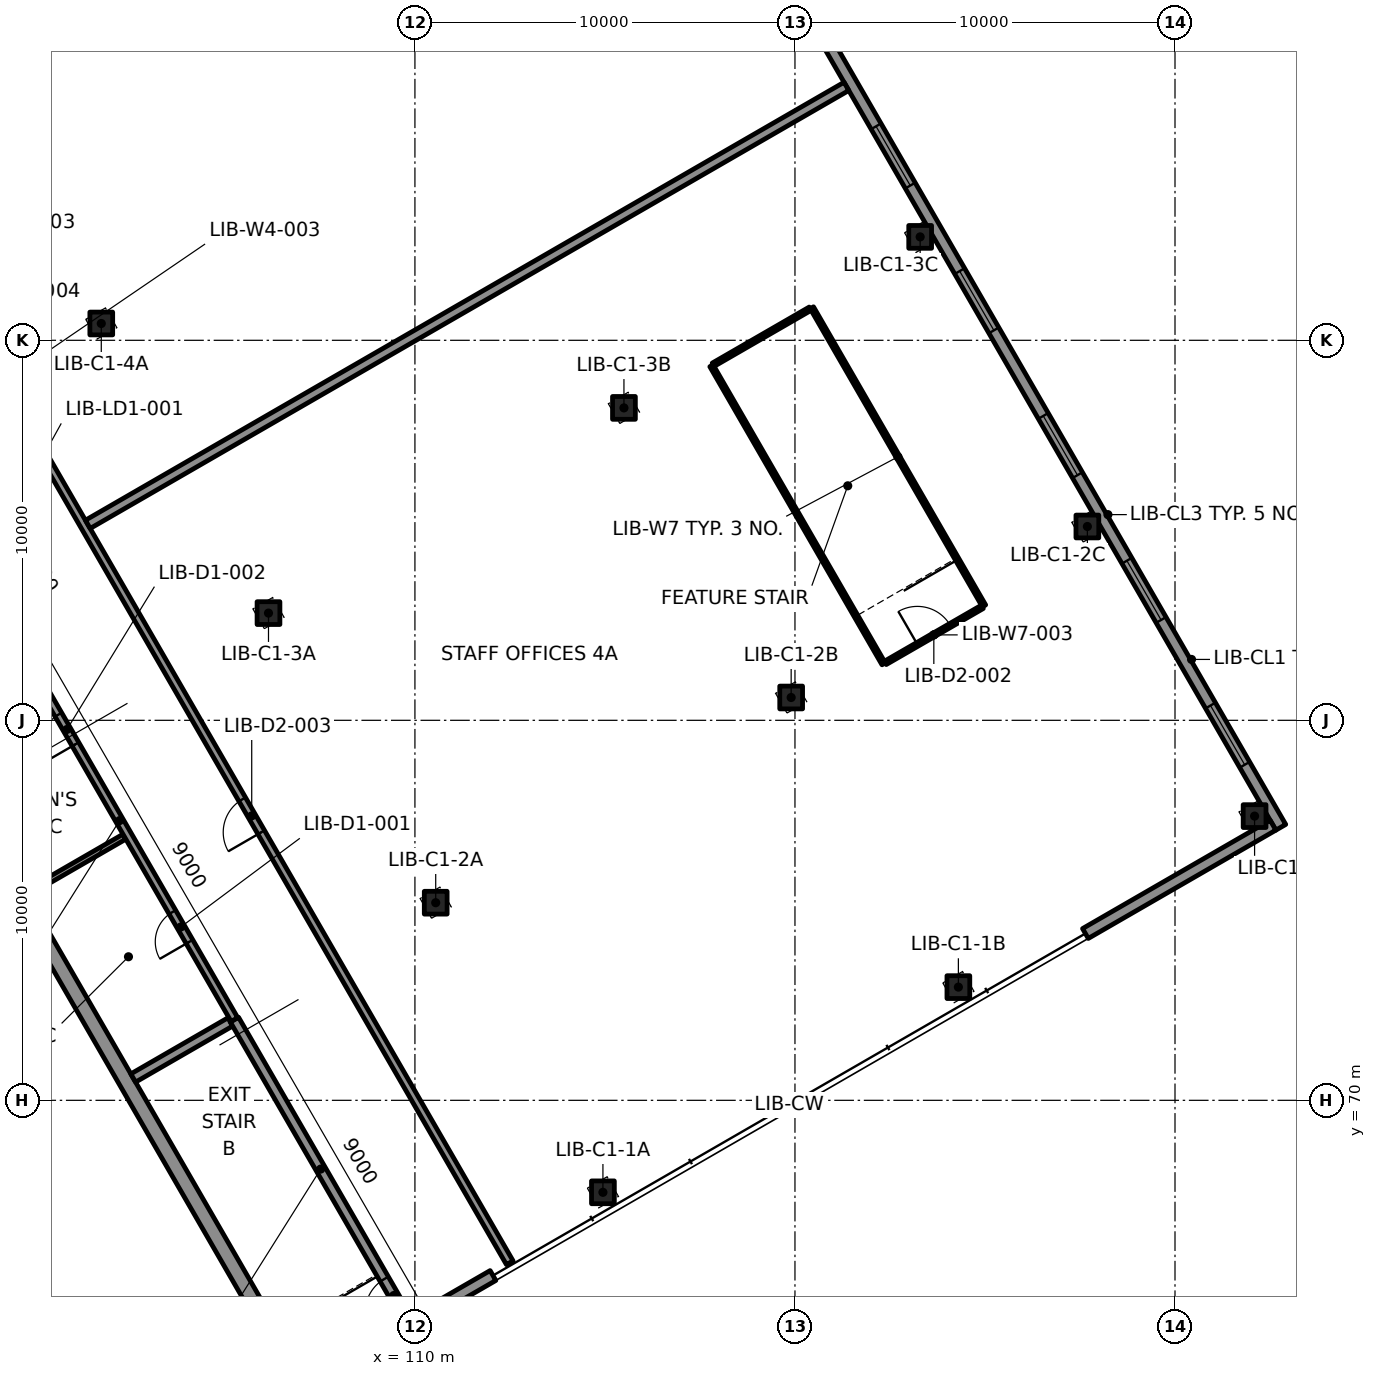
"""IFC4 building model, lengths in metres.
Left out: names, types, materials, properties, quantities, classifications, styles, units other than length and angle.
Written with IfcOpenShell. Run it as: python <this file> out.ifc"""

import sys

from ifc_helpers import new_model, si_unit, direction, frame, frame_2d, origin, origin_2d, place, context, subcontext, project, spatial, rectangle, extrude, element, fill, save


model = new_model("IFC4")
c1 = context("Model", 3, precision=1e-05, world=origin(), true_north=direction((0.0, 1.0)))
c2 = subcontext(c1, "Body", "Model", "MODEL_VIEW")
j1 = project(units=[si_unit("LENGTHUNIT", "METRE"), si_unit("PLANEANGLEUNIT", "RADIAN")], contexts=[c1])
p1 = place(None, origin())
s1 = spatial("IfcSite", under=j1, at=p1, CompositionType="ELEMENT")
p2 = place(p1, origin())
s2 = spatial("IfcBuilding", under=s1, at=p2, CompositionType="ELEMENT")
p3 = place(p2, frame((0.0, 0.0, 21.8)))
s3 = spatial("IfcBuildingStorey", under=s2, at=p3, CompositionType="ELEMENT", Elevation=21.8)
p4 = place(p3, frame((101.821, 68.315, -0.0), z_axis=(0.0, 0.0, 1.0), x_axis=(-0.5, 0.866025403784, 0.0)))
e1 = element("IfcColumn", 1, at=p4, inside=s3, PredefinedType="COLUMN", context=c2, shape_type="SweptSolid", body=[
    extrude(rectangle(XDim=1.2, YDim=1.5, at=origin_2d()), origin(), (0.0, 0.0, 1.0), 4.6),
])
p5 = place(p3, frame((103.019, 59.863, 0.0), z_axis=(0.0, 0.0, 1.0), x_axis=(-0.866027754727, 0.499995928025, 0.0)))
e2 = element("IfcWall", 2, at=p5, inside=s3, PredefinedType="PARTITIONING", context=c2, shape_type="SweptSolid", body=[
    extrude(rectangle(XDim=13.214, YDim=0.15, at=frame_2d((6.607, 0.0))), origin(), (0.0, 0.0, 1.0), 3.7),
])
for number, where, z_axis, x_axis in (
    (3, (114.947, 67.579, -0.36), (0.0, 0.0, 1.0), (1.0, 0.0, 0.0)),
    (4, (124.3, 72.979, -0.36), (0.0, 0.0, 1.0), (1.0, 0.0, 0.0)),
    (5, (132.094, 77.479, -0.36), (0.0, 0.0, 1.0), (1.0, 0.0, 0.0)),
    (6, (110.547, 75.2, -0.36), (0.0, 0.0, 1.0), (1.0, 0.0, 0.0)),
    (7, (119.9, 80.6, -0.36), (0.0, 0.0, 1.0), (1.0, 0.0, 0.0)),
    (8, (127.694, 85.1, -0.36), (0.0, 0.0, 1.0), (1.0, 0.0, 0.0)),
    (9, (106.147, 82.821, -0.36), (0.0, 0.0, 1.0), (1.0, 0.0, 0.0)),
    (10, (115.5, 88.221, -0.36), (0.0, 0.0, 1.0), (1.0, 0.0, 0.0)),
    (11, (123.294, 92.721, -0.36), (0.0, 0.0, 1.0), (1.0, 0.0, 0.0)),
    (12, (101.747, 90.442, -0.36), (0.0, 0.0, 1.0), (1.0, 0.0, 0.0)),
):
    element("IfcColumn", number, at=place(p3, frame(where, z_axis=z_axis, x_axis=x_axis)), inside=s3, PredefinedType="COLUMN", context=c2, shape_type="SweptSolid", body=[
        extrude(rectangle(XDim=0.6, YDim=0.6, at=origin_2d()), origin(), (0.0, 0.0, 1.0), 4.66),
    ])
p6 = place(p3, frame((107.106, 62.36, 0.0), z_axis=(0.0, 0.0, 1.0), x_axis=(-0.49999992739, 0.866025445706, 0.0)))
e13 = element("IfcWall", 13, at=p6, inside=s3, PredefinedType="SOLIDWALL", context=c2, shape_type="SweptSolid", body=[
    extrude(rectangle(XDim=54.0, YDim=0.4, at=frame_2d((27.0, 0.0))), origin(), (0.0, 0.0, 1.0), 4.3),
])
p7 = place(p3, frame((132.784, 77.185, 0.0), z_axis=(0.0, 0.0, 1.0), x_axis=(-0.49999992739, 0.866025445706, 0.0)))
e14 = element("IfcWall", 14, at=p7, inside=s3, PredefinedType="SOLIDWALL", context=c2, shape_type="SweptSolid", body=[
    extrude(rectangle(XDim=54.0, YDim=0.3, at=frame_2d((27.0, 0.0))), origin(), (0.0, 0.0, 1.0), 4.3),
])
p8 = place(p7, frame((1.9, 0.0, 0.9)))
e15 = element("IfcOpeningElement", 15, at=p8, cuts=e14, PredefinedType="OPENING", context=c2, shape_type="SweptSolid", body=[
    extrude(rectangle(XDim=1.8, YDim=2.4, at=frame_2d((0.9, 1.2))), frame((0.0, 0.16, 0.0), z_axis=(0.0, -1.0, 0.0), x_axis=(1.0, 0.0, 0.0)), (0.0, 0.0, 1.0), 0.32),
])
p9 = place(p7, frame((6.3, 0.0, 0.9)))
e16 = element("IfcOpeningElement", 16, at=p9, cuts=e14, PredefinedType="OPENING", context=c2, shape_type="SweptSolid", body=[
    extrude(rectangle(XDim=1.8, YDim=2.4, at=frame_2d((0.9, 1.2))), frame((0.0, 0.16, 0.0), z_axis=(0.0, -1.0, 0.0), x_axis=(1.0, 0.0, 0.0)), (0.0, 0.0, 1.0), 0.32),
])
p10 = place(p7, frame((10.7, 0.0, 0.9)))
e17 = element("IfcOpeningElement", 17, at=p10, cuts=e14, PredefinedType="OPENING", context=c2, shape_type="SweptSolid", body=[
    extrude(rectangle(XDim=1.8, YDim=2.4, at=frame_2d((0.9, 1.2))), frame((0.0, 0.16, 0.0), z_axis=(0.0, -1.0, 0.0), x_axis=(1.0, 0.0, 0.0)), (0.0, 0.0, 1.0), 0.32),
])
p11 = place(p7, frame((15.1, 0.0, 0.9)))
e18 = element("IfcOpeningElement", 18, at=p11, cuts=e14, PredefinedType="OPENING", context=c2, shape_type="SweptSolid", body=[
    extrude(rectangle(XDim=1.8, YDim=2.4, at=frame_2d((0.9, 1.2))), frame((0.0, 0.16, 0.0), z_axis=(0.0, -1.0, 0.0), x_axis=(1.0, 0.0, 0.0)), (0.0, 0.0, 1.0), 0.32),
])
p12 = place(p7, frame((19.5, 0.0, 0.9)))
e19 = element("IfcOpeningElement", 19, at=p12, cuts=e14, PredefinedType="OPENING", context=c2, shape_type="SweptSolid", body=[
    extrude(rectangle(XDim=1.8, YDim=2.4, at=frame_2d((0.9, 1.2))), frame((0.0, 0.16, 0.0), z_axis=(0.0, -1.0, 0.0), x_axis=(1.0, 0.0, 0.0)), (0.0, 0.0, 1.0), 0.32),
])
p13 = place(p7, frame((41.5, 0.0, 0.9)))
e20 = element("IfcOpeningElement", 20, at=p13, cuts=e14, PredefinedType="OPENING", context=c2, shape_type="SweptSolid", body=[
    extrude(rectangle(XDim=1.8, YDim=2.4, at=frame_2d((0.9, 1.2))), frame((0.0, 0.16, 0.0), z_axis=(0.0, -1.0, 0.0), x_axis=(1.0, 0.0, 0.0)), (0.0, 0.0, 1.0), 0.32),
])
p14 = place(p7, frame((45.9, 0.0, 0.9)))
e21 = element("IfcOpeningElement", 21, at=p14, cuts=e14, PredefinedType="OPENING", context=c2, shape_type="SweptSolid", body=[
    extrude(rectangle(XDim=1.8, YDim=2.4, at=frame_2d((0.9, 1.2))), frame((0.0, 0.16, 0.0), z_axis=(0.0, -1.0, 0.0), x_axis=(1.0, 0.0, 0.0)), (0.0, 0.0, 1.0), 0.32),
])
p15 = place(p7, frame((50.3, 0.0, 0.9)))
e22 = element("IfcOpeningElement", 22, at=p15, cuts=e14, PredefinedType="OPENING", context=c2, shape_type="SweptSolid", body=[
    extrude(rectangle(XDim=1.8, YDim=2.4, at=frame_2d((0.9, 1.2))), frame((0.0, 0.16, 0.0), z_axis=(0.0, -1.0, 0.0), x_axis=(1.0, 0.0, 0.0)), (0.0, 0.0, 1.0), 0.32),
])
p16 = place(p3, frame((107.204, 62.59, 0.0), z_axis=(0.0, 0.0, 1.0), x_axis=(0.866045472092, 0.499965239061, 0.0)))
e23 = element("IfcWall", 23, at=p16, inside=s3, PredefinedType="SOLIDWALL", context=c2, shape_type="SweptSolid", body=[
    extrude(rectangle(XDim=5.6, YDim=0.3, at=frame_2d((2.8, 0.0))), origin(), (0.0, 0.0, 1.0), 4.3),
])
p17 = place(p3, frame((127.643, 74.389, 0.0), z_axis=(0.0, 0.0, 1.0), x_axis=(0.866025820012, 0.499999279071, 0.0)))
e24 = element("IfcWall", 24, at=p17, inside=s3, PredefinedType="SOLIDWALL", context=c2, shape_type="SweptSolid", body=[
    extrude(rectangle(XDim=5.7, YDim=0.3, at=frame_2d((2.85, 0.0))), origin(), (0.0, 0.0, 1.0), 4.3),
])
p18 = place(p3, frame((102.587, 70.587, 0.0), z_axis=(0.0, 0.0, 1.0), x_axis=(0.866039495442, 0.49997559174, 0.0)))
e25 = element("IfcWall", 25, at=p18, inside=s3, PredefinedType="SOLIDWALL", context=c2, shape_type="SweptSolid", body=[
    extrude(rectangle(XDim=2.95, YDim=0.25, at=frame_2d((1.475, 0.0))), origin(), (0.0, 0.0, 1.0), 4.3),
])
p19 = place(p3, frame((109.792, 64.257, 0.0), z_axis=(0.0, 0.0, 1.0), x_axis=(-0.499994616197, 0.866028512102, 0.0)))
e26 = element("IfcWall", 26, at=p19, inside=s3, PredefinedType="SOLIDWALL", context=c2, shape_type="SweptSolid", body=[
    extrude(rectangle(XDim=9.085, YDim=0.25, at=frame_2d((4.542, 0.0))), origin(), (0.0, 0.0, 1.0), 4.3),
])
p20 = place(p19, frame((0.2, 0.0, 0.0)))
e27 = element("IfcOpeningElement", 27, at=p20, cuts=e26, PredefinedType="OPENING", context=c2, shape_type="SweptSolid", body=[
    extrude(rectangle(XDim=1.0, YDim=2.1, at=frame_2d((0.5, 1.05))), frame((0.0, 0.135, 0.0), z_axis=(0.0, -1.0, 0.0), x_axis=(1.0, 0.0, 0.0)), (0.0, 0.0, 1.0), 0.27),
])
p21 = place(p3, frame((99.779, 75.45, 0.0), z_axis=(0.0, 0.0, 1.0), x_axis=(0.866017493347, 0.500013701029, 0.0)))
e28 = element("IfcWall", 28, at=p21, inside=s3, PredefinedType="PARTITIONING", context=c2, shape_type="SweptSolid", body=[
    extrude(rectangle(XDim=2.975, YDim=0.15, at=frame_2d((1.488, 0.0))), origin(), (0.0, 0.0, 1.0), 4.3),
])
p22 = place(p3, frame((105.25, 72.125, 0.0), z_axis=(0.0, 0.0, 1.0), x_axis=(-0.499996309931, 0.866027534236, 0.0)))
e29 = element("IfcWall", 29, at=p22, inside=s3, PredefinedType="PARTITIONING", context=c2, shape_type="SweptSolid", body=[
    extrude(rectangle(XDim=12.09, YDim=0.2, at=frame_2d((6.045, 0.0))), origin(), (0.0, 0.0, 1.0), 4.3),
])
p23 = place(p22, frame((2.365, 0.0, 0.0)))
e30 = element("IfcOpeningElement", 30, at=p23, cuts=e29, PredefinedType="OPENING", context=c2, shape_type="SweptSolid", body=[
    extrude(rectangle(XDim=0.9, YDim=2.1, at=frame_2d((0.45, 1.05))), frame((0.0, 0.11, 0.0), z_axis=(0.0, -1.0, 0.0), x_axis=(1.0, 0.0, 0.0)), (0.0, 0.0, 1.0), 0.22),
])
p24 = place(p22, frame((8.365, 0.0, 0.0)))
e31 = element("IfcOpeningElement", 31, at=p24, cuts=e29, PredefinedType="OPENING", context=c2, shape_type="SweptSolid", body=[
    extrude(rectangle(XDim=0.9, YDim=2.1, at=frame_2d((0.45, 1.05))), frame((0.0, 0.11, 0.0), z_axis=(0.0, -1.0, 0.0), x_axis=(1.0, 0.0, 0.0)), (0.0, 0.0, 1.0), 0.22),
])
p25 = place(p3, frame((112.496, 65.725, 0.0), z_axis=(0.0, 0.0, 1.0), x_axis=(-0.499998673217, 0.866026169802, 0.0)))
e32 = element("IfcWall", 32, at=p25, inside=s3, PredefinedType="PARTITIONING", context=c2, shape_type="SweptSolid", body=[
    extrude(rectangle(XDim=53.48, YDim=0.2, at=frame_2d((26.74, 0.0))), origin(), (0.0, 0.0, 1.0), 4.3),
])
p26 = place(p25, frame((13.08, 0.0, 0.0)))
e33 = element("IfcOpeningElement", 33, at=p26, cuts=e32, PredefinedType="OPENING", context=c2, shape_type="SweptSolid", body=[
    extrude(rectangle(XDim=1.0, YDim=2.1, at=frame_2d((0.5, 1.05))), frame((0.0, 0.11, 0.0), z_axis=(0.0, -1.0, 0.0), x_axis=(1.0, 0.0, 0.0)), (0.0, 0.0, 1.0), 0.22),
])
p27 = place(p25, frame((26.28, 0.0, 0.0)))
e34 = element("IfcOpeningElement", 34, at=p27, cuts=e32, PredefinedType="OPENING", context=c2, shape_type="SweptSolid", body=[
    extrude(rectangle(XDim=1.0, YDim=2.1, at=frame_2d((0.5, 1.05))), frame((0.0, 0.11, 0.0), z_axis=(0.0, -1.0, 0.0), x_axis=(1.0, 0.0, 0.0)), (0.0, 0.0, 1.0), 0.22),
])
p28 = place(p25, frame((43.88, 0.0, 0.0)))
e35 = element("IfcOpeningElement", 35, at=p28, cuts=e32, PredefinedType="OPENING", context=c2, shape_type="SweptSolid", body=[
    extrude(rectangle(XDim=1.0, YDim=2.1, at=frame_2d((0.5, 1.05))), frame((0.0, 0.11, 0.0), z_axis=(0.0, -1.0, 0.0), x_axis=(1.0, 0.0, 0.0)), (0.0, 0.0, 1.0), 0.22),
])
p29 = place(p25, frame((50.58, 0.0, 0.0)))
e36 = element("IfcOpeningElement", 36, at=p29, cuts=e32, PredefinedType="OPENING", context=c2, shape_type="SweptSolid", body=[
    extrude(rectangle(XDim=1.0, YDim=2.1, at=frame_2d((0.5, 1.05))), frame((0.0, 0.11, 0.0), z_axis=(0.0, -1.0, 0.0), x_axis=(1.0, 0.0, 0.0)), (0.0, 0.0, 1.0), 0.22),
])
p30 = place(p3, frame((101.392, 85.157, 0.0), z_axis=(0.0, 0.0, 1.0), x_axis=(0.866022961126, 0.500004230785, 0.0)))
e37 = element("IfcWall", 37, at=p30, inside=s3, PredefinedType="SOLIDWALL", context=c2, shape_type="SweptSolid", body=[
    extrude(rectangle(XDim=23.05, YDim=0.25, at=frame_2d((11.525, 0.0))), origin(), (0.0, 0.0, 1.0), 4.3),
])
for number, where, z_axis, x_axis in (
    (38, (122.333, 81.486, 0.0), (0.0, 0.0, 1.0), (-0.5, 0.866, 0.0)),
    (39, (124.975, 83.01, 0.0), (0.0, 0.0, 1.0), (-0.5, 0.866, 0.0)),
):
    element("IfcWall", number, at=place(p3, frame(where, z_axis=z_axis, x_axis=x_axis)), inside=s3, PredefinedType="PARTITIONING", context=c2, shape_type="SweptSolid", body=[
        extrude(rectangle(XDim=9.06, YDim=0.1, at=frame_2d((4.53, 0.0))), origin(), (0.0, 0.0, 1.0), 4.3),
    ])
p31 = place(p3, frame((122.377, 81.51, 0.0), z_axis=(0.0, 0.0, 1.0), x_axis=(0.866003658127, 0.500037662692, 0.0)))
e40 = element("IfcWall", 40, at=p31, inside=s3, PredefinedType="PARTITIONING", context=c2, shape_type="SweptSolid", body=[
    extrude(rectangle(XDim=2.95, YDim=0.1, at=frame_2d((1.475, 0.0))), origin(), (0.0, 0.0, 1.0), 4.3),
])
p32 = place(p31, frame((0.975, 0.0, 0.0)))
e41 = element("IfcOpeningElement", 41, at=p32, cuts=e40, PredefinedType="OPENING", context=c2, shape_type="SweptSolid", body=[
    extrude(rectangle(XDim=1.0, YDim=2.1, at=frame_2d((0.5, 1.05))), frame((0.0, 0.06, 0.0), z_axis=(0.0, -1.0, 0.0), x_axis=(1.0, 0.0, 0.0)), (0.0, 0.0, 1.0), 0.12),
])
p33 = place(p3, frame((117.847, 89.357, 0.0), z_axis=(0.0, 0.0, 1.0), x_axis=(0.866003658127, 0.500037662692, 0.0)))
e42 = element("IfcWall", 42, at=p33, inside=s3, PredefinedType="PARTITIONING", context=c2, shape_type="SweptSolid", body=[
    extrude(rectangle(XDim=2.95, YDim=0.1, at=frame_2d((1.475, 0.0))), origin(), (0.0, 0.0, 1.0), 4.3),
])
p34 = place(p8, origin())
e43 = element("IfcWindow", 43, at=p34, inside=s3, PartitioningType="SINGLE_PANEL", PredefinedType="WINDOW", context=c2, shape_type="SweptSolid", body=[
    extrude(rectangle(XDim=1.8, YDim=2.4, at=frame_2d((0.9, 1.2))), frame((0.0, 0.03, 0.0), z_axis=(0.0, -1.0, 0.0), x_axis=(1.0, 0.0, 0.0)), (0.0, 0.0, 1.0), 0.06),
])
fill(e15, e43)
p35 = place(p9, origin())
e44 = element("IfcWindow", 44, at=p35, inside=s3, PartitioningType="SINGLE_PANEL", PredefinedType="WINDOW", context=c2, shape_type="SweptSolid", body=[
    extrude(rectangle(XDim=1.8, YDim=2.4, at=frame_2d((0.9, 1.2))), frame((0.0, 0.03, 0.0), z_axis=(0.0, -1.0, 0.0), x_axis=(1.0, 0.0, 0.0)), (0.0, 0.0, 1.0), 0.06),
])
fill(e16, e44)
p36 = place(p10, origin())
e45 = element("IfcWindow", 45, at=p36, inside=s3, PartitioningType="SINGLE_PANEL", PredefinedType="WINDOW", context=c2, shape_type="SweptSolid", body=[
    extrude(rectangle(XDim=1.8, YDim=2.4, at=frame_2d((0.9, 1.2))), frame((0.0, 0.03, 0.0), z_axis=(0.0, -1.0, 0.0), x_axis=(1.0, 0.0, 0.0)), (0.0, 0.0, 1.0), 0.06),
])
fill(e17, e45)
p37 = place(p11, origin())
e46 = element("IfcWindow", 46, at=p37, inside=s3, PartitioningType="SINGLE_PANEL", PredefinedType="WINDOW", context=c2, shape_type="SweptSolid", body=[
    extrude(rectangle(XDim=1.8, YDim=2.4, at=frame_2d((0.9, 1.2))), frame((0.0, 0.03, 0.0), z_axis=(0.0, -1.0, 0.0), x_axis=(1.0, 0.0, 0.0)), (0.0, 0.0, 1.0), 0.06),
])
fill(e18, e46)
p38 = place(p12, origin())
e47 = element("IfcWindow", 47, at=p38, inside=s3, PartitioningType="SINGLE_PANEL", PredefinedType="WINDOW", context=c2, shape_type="SweptSolid", body=[
    extrude(rectangle(XDim=1.8, YDim=2.4, at=frame_2d((0.9, 1.2))), frame((0.0, 0.03, 0.0), z_axis=(0.0, -1.0, 0.0), x_axis=(1.0, 0.0, 0.0)), (0.0, 0.0, 1.0), 0.06),
])
fill(e19, e47)
p39 = place(p20, origin())
e48 = element("IfcDoor", 48, at=p39, inside=s3, OperationType="SINGLE_SWING_LEFT", PredefinedType="DOOR", context=c2, shape_type="SweptSolid", body=[
    extrude(rectangle(XDim=1.0, YDim=2.1, at=frame_2d((0.5, 1.05))), frame((0.0, 0.025, 0.0), z_axis=(0.0, -1.0, 0.0), x_axis=(1.0, 0.0, 0.0)), (0.0, 0.0, 1.0), 0.05),
])
fill(e27, e48)
p40 = place(p23, origin())
e49 = element("IfcDoor", 49, at=p40, inside=s3, OperationType="SINGLE_SWING_LEFT", PredefinedType="DOOR", context=c2, shape_type="SweptSolid", body=[
    extrude(rectangle(XDim=0.9, YDim=2.1, at=frame_2d((0.45, 1.05))), frame((0.0, 0.025, 0.0), z_axis=(0.0, -1.0, 0.0), x_axis=(1.0, 0.0, 0.0)), (0.0, 0.0, 1.0), 0.05),
])
fill(e30, e49)
p41 = place(p24, origin())
e50 = element("IfcDoor", 50, at=p41, inside=s3, OperationType="SINGLE_SWING_RIGHT", PredefinedType="DOOR", context=c2, shape_type="SweptSolid", body=[
    extrude(rectangle(XDim=0.9, YDim=2.1, at=frame_2d((0.45, 1.05))), frame((0.0, 0.025, 0.0), z_axis=(0.0, -1.0, 0.0), x_axis=(1.0, 0.0, 0.0)), (0.0, 0.0, 1.0), 0.05),
])
fill(e31, e50)
p42 = place(p32, origin())
e51 = element("IfcDoor", 51, at=p42, inside=s3, OperationType="SINGLE_SWING_RIGHT", PredefinedType="DOOR", context=c2, shape_type="SweptSolid", body=[
    extrude(rectangle(XDim=1.0, YDim=2.1, at=frame_2d((0.5, 1.05))), frame((0.0, 0.025, 0.0), z_axis=(0.0, -1.0, 0.0), x_axis=(1.0, 0.0, 0.0)), (0.0, 0.0, 1.0), 0.05),
])
fill(e41, e51)
p43 = place(p26, origin())
e52 = element("IfcDoor", 52, at=p43, inside=s3, OperationType="SINGLE_SWING_LEFT", PredefinedType="DOOR", context=c2, shape_type="SweptSolid", body=[
    extrude(rectangle(XDim=1.0, YDim=2.1, at=frame_2d((0.5, 1.05))), frame((0.0, 0.025, 0.0), z_axis=(0.0, -1.0, 0.0), x_axis=(1.0, 0.0, 0.0)), (0.0, 0.0, 1.0), 0.05),
])
fill(e33, e52)
save(model, sys.argv[1])
